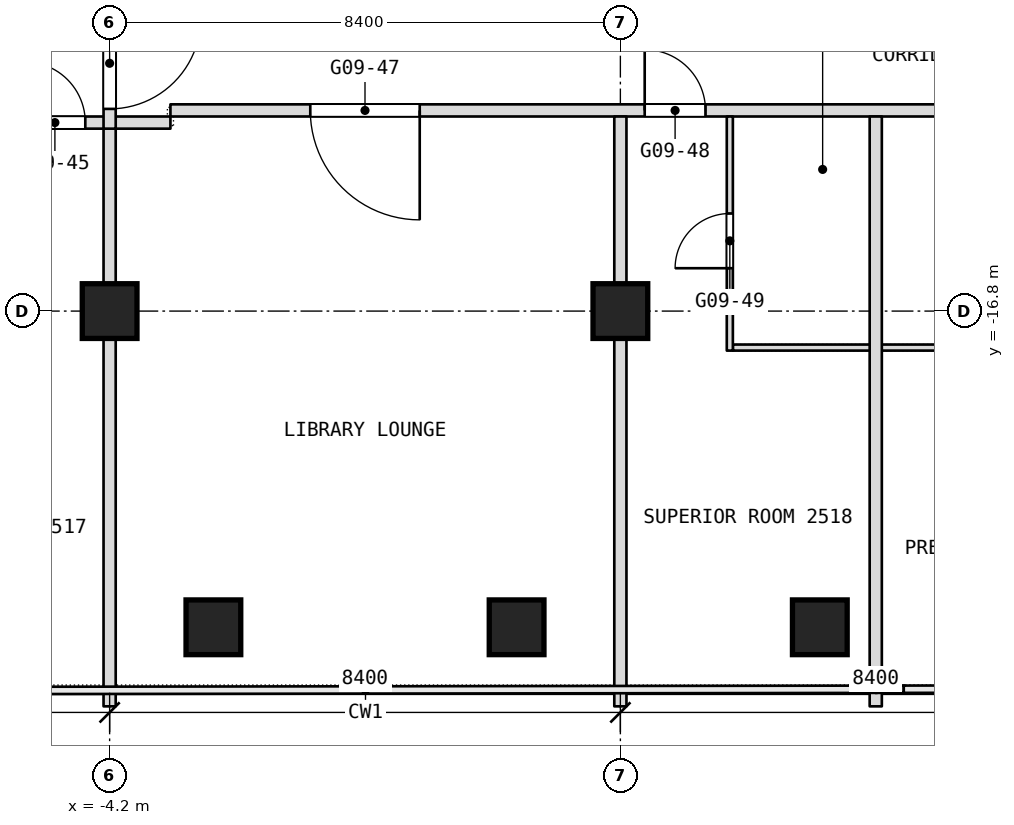
"""IFC4 building model, lengths in metres.
Left out: names, types, materials, properties, quantities, classifications, styles, units other than length and angle.
Written with IfcOpenShell. Run it as: python <this file> out.ifc"""

import sys

from ifc_helpers import new_model, si_unit, direction, frame, frame_2d, origin, origin_2d, place, context, subcontext, project, spatial, rectangle, extrude, element, fill, save


model = new_model("IFC4")
c1 = context("Model", 3, precision=1e-05, world=origin(), true_north=direction((0.0, 1.0)))
c2 = subcontext(c1, "Body", "Model", "MODEL_VIEW")
j1 = project(units=[si_unit("LENGTHUNIT", "METRE"), si_unit("PLANEANGLEUNIT", "RADIAN")], contexts=[c1])
p1 = place(None, origin())
s1 = spatial("IfcSite", under=j1, at=p1, CompositionType="ELEMENT")
p2 = place(p1, origin())
s2 = spatial("IfcBuilding", under=s1, at=p2, CompositionType="ELEMENT")
p3 = place(p2, frame((0.0, 0.0, 115.7)))
s3 = spatial("IfcBuildingStorey", under=s2, at=p3, CompositionType="ELEMENT", Elevation=115.7)
for number, where, z_axis, x_axis in (
    (1, (-4.2, -16.8, 0.0), (0.0, 0.0, 1.0), (1.0, 0.0, 0.0)),
    (2, (4.2, -16.8, 0.0), (0.0, 0.0, 1.0), (1.0, 0.0, 0.0)),
    (3, (7.48, -22.0, 0.0), (0.0, 0.0, 1.0), (1.0, 0.0, 0.0)),
    (4, (2.493, -22.0, 0.0), (0.0, 0.0, 1.0), (1.0, 0.0, 0.0)),
    (5, (-2.493, -22.0, 0.0), (0.0, 0.0, 1.0), (1.0, 0.0, 0.0)),
):
    element("IfcColumn", number, at=place(p3, frame(where, z_axis=z_axis, x_axis=x_axis)), inside=s3, PredefinedType="COLUMN", context=c2, shape_type="SweptSolid", body=[
        extrude(rectangle(XDim=0.9, YDim=0.9, at=origin_2d()), origin(), (0.0, 0.0, 1.0), 3.6),
    ])
p4 = place(p3, frame((6.05, -17.4, 0.0), z_axis=(0.0, 0.0, 1.0), x_axis=(1.0, 0.0, 0.0)))
e6 = element("IfcWall", 6, at=p4, inside=s3, PredefinedType="PARTITIONING", context=c2, shape_type="SweptSolid", body=[
    extrude(rectangle(XDim=4.8, YDim=0.1, at=frame_2d((2.4, 0.0))), origin(), (0.0, 0.0, 1.0), 3.34),
])
p5 = place(p4, frame((3.75, 0.0, 0.0)))
e7 = element("IfcOpeningElement", 7, at=p5, cuts=e6, PredefinedType="OPENING", context=c2, shape_type="SweptSolid", body=[
    extrude(rectangle(XDim=0.9, YDim=2.1, at=frame_2d((0.45, 1.05))), frame((0.0, 0.05, 0.0), z_axis=(0.0, -1.0, 0.0), x_axis=(1.0, 0.0, 0.0)), (0.0, 0.0, 1.0), 0.1),
])
p6 = place(p3, frame((-12.4, -13.7, 0.0), z_axis=(0.0, 0.0, 1.0), x_axis=(1.0, 0.0, 0.0)))
e8 = element("IfcWall", 8, at=p6, inside=s3, PredefinedType="PARTITIONING", context=c2, shape_type="SweptSolid", body=[
    extrude(rectangle(XDim=9.2, YDim=0.2, at=frame_2d((4.6, 0.0))), origin(), (0.0, 0.0, 1.0), 3.34),
])
p7 = place(p6, frame((0.2, 0.0, 0.0)))
e9 = element("IfcOpeningElement", 9, at=p7, cuts=e8, PredefinedType="OPENING", context=c2, shape_type="SweptSolid", body=[
    extrude(rectangle(XDim=1.0, YDim=2.1, at=frame_2d((0.5, 1.05))), frame((0.0, 0.1, 0.0), z_axis=(0.0, -1.0, 0.0), x_axis=(1.0, 0.0, 0.0)), (0.0, 0.0, 1.0), 0.2),
])
p8 = place(p6, frame((6.8, 0.0, 0.0)))
e10 = element("IfcOpeningElement", 10, at=p8, cuts=e8, PredefinedType="OPENING", context=c2, shape_type="SweptSolid", body=[
    extrude(rectangle(XDim=1.0, YDim=2.1, at=frame_2d((0.5, 1.05))), frame((0.0, 0.1, 0.0), z_axis=(0.0, -1.0, 0.0), x_axis=(1.0, 0.0, 0.0)), (0.0, 0.0, 1.0), 0.2),
])
p9 = place(p3, frame((-3.2, -13.5, 0.0), z_axis=(0.0, 0.0, 1.0), x_axis=(1.0, 0.0, 0.0)))
e11 = element("IfcWall", 11, at=p9, inside=s3, PredefinedType="PARTITIONING", context=c2, shape_type="SweptSolid", body=[
    extrude(rectangle(XDim=19.9, YDim=0.2, at=frame_2d((9.95, 0.0))), origin(), (0.0, 0.0, 1.0), 3.34),
])
p10 = place(p9, frame((2.3, 0.0, 0.0)))
e12 = element("IfcOpeningElement", 12, at=p10, cuts=e11, PredefinedType="OPENING", context=c2, shape_type="SweptSolid", body=[
    extrude(rectangle(XDim=1.8, YDim=2.1, at=frame_2d((0.9, 1.05))), frame((0.0, 0.1, 0.0), z_axis=(0.0, -1.0, 0.0), x_axis=(1.0, 0.0, 0.0)), (0.0, 0.0, 1.0), 0.2),
])
p11 = place(p9, frame((7.8, 0.0, 0.0)))
e13 = element("IfcOpeningElement", 13, at=p11, cuts=e11, PredefinedType="OPENING", context=c2, shape_type="SweptSolid", body=[
    extrude(rectangle(XDim=1.0, YDim=2.1, at=frame_2d((0.5, 1.05))), frame((0.0, 0.1, 0.0), z_axis=(0.0, -1.0, 0.0), x_axis=(1.0, 0.0, 0.0)), (0.0, 0.0, 1.0), 0.2),
])
p12 = place(p9, frame((14.4, 0.0, 0.0)))
e14 = element("IfcOpeningElement", 14, at=p12, cuts=e11, PredefinedType="OPENING", context=c2, shape_type="SweptSolid", body=[
    extrude(rectangle(XDim=1.0, YDim=2.1, at=frame_2d((0.5, 1.05))), frame((0.0, 0.1, 0.0), z_axis=(0.0, -1.0, 0.0), x_axis=(1.0, 0.0, 0.0)), (0.0, 0.0, 1.0), 0.2),
])
p13 = place(p9, frame((18.6, 0.0, 0.0)))
e15 = element("IfcOpeningElement", 15, at=p13, cuts=e11, PredefinedType="OPENING", context=c2, shape_type="SweptSolid", body=[
    extrude(rectangle(XDim=1.0, YDim=2.1, at=frame_2d((0.5, 1.05))), frame((0.0, 0.1, 0.0), z_axis=(0.0, -1.0, 0.0), x_axis=(1.0, 0.0, 0.0)), (0.0, 0.0, 1.0), 0.2),
])
p14 = place(p3, frame((8.4, -23.3, 0.0), z_axis=(0.0, 0.0, 1.0), x_axis=(0.0, 1.0, 0.0)))
e16 = element("IfcWall", 16, at=p14, inside=s3, PredefinedType="PARTITIONING", context=c2, shape_type="SweptSolid", body=[
    extrude(rectangle(XDim=9.7, YDim=0.2, at=frame_2d((4.85, 0.0))), origin(), (0.0, 0.0, 1.0), 3.34),
])
p15 = place(p3, frame((6.0, -17.45, 0.0), z_axis=(0.0, 0.0, 1.0), x_axis=(0.0, 1.0, 0.0)))
e17 = element("IfcWall", 17, at=p15, inside=s3, PredefinedType="PARTITIONING", context=c2, shape_type="SweptSolid", body=[
    extrude(rectangle(XDim=3.85, YDim=0.1, at=frame_2d((1.925, 0.0))), origin(), (0.0, 0.0, 1.0), 3.34),
])
p16 = place(p15, frame((1.355, 0.0, 0.0)))
e18 = element("IfcOpeningElement", 18, at=p16, cuts=e17, PredefinedType="OPENING", context=c2, shape_type="SweptSolid", body=[
    extrude(rectangle(XDim=0.9, YDim=2.1, at=frame_2d((0.45, 1.05))), frame((0.0, 0.05, 0.0), z_axis=(0.0, -1.0, 0.0), x_axis=(1.0, 0.0, 0.0)), (0.0, 0.0, 1.0), 0.1),
])
p17 = place(p3, frame((4.2, -23.3, 0.0), z_axis=(0.0, 0.0, 1.0), x_axis=(0.0, 1.0, 0.0)))
e19 = element("IfcWall", 19, at=p17, inside=s3, PredefinedType="PARTITIONING", context=c2, shape_type="SweptSolid", body=[
    extrude(rectangle(XDim=9.7, YDim=0.2, at=frame_2d((4.85, 0.0))), origin(), (0.0, 0.0, 1.0), 3.34),
])
p18 = place(p3, frame((-4.2, -23.3, 0.0), z_axis=(0.0, 0.0, 1.0), x_axis=(0.0, 1.0, 0.0)))
e20 = element("IfcWall", 20, at=p18, inside=s3, PredefinedType="PARTITIONING", context=c2, shape_type="SweptSolid", body=[
    extrude(rectangle(XDim=9.5, YDim=0.2, at=frame_2d((4.75, 0.0))), origin(), (0.0, 0.0, 1.0), 3.34),
])
p19 = place(p3, frame((-4.2, -13.8, 0.0), z_axis=(0.0, 0.0, 1.0), x_axis=(0.0, 1.0, 0.0)))
e21 = element("IfcWall", 21, at=p19, inside=s3, PredefinedType="PARTITIONING", context=c2, shape_type="SweptSolid", body=[
    extrude(rectangle(XDim=13.8, YDim=0.2, at=frame_2d((6.9, 0.0))), origin(), (0.0, 0.0, 1.0), 3.34),
])
p20 = place(p19, frame((12.15, 0.0, 0.0)))
e22 = element("IfcOpeningElement", 22, at=p20, cuts=e21, PredefinedType="OPENING", context=c2, shape_type="SweptSolid", body=[
    extrude(rectangle(XDim=1.5, YDim=2.1, at=frame_2d((0.75, 1.05))), frame((0.0, 0.1, 0.0), z_axis=(0.0, -1.0, 0.0), x_axis=(1.0, 0.0, 0.0)), (0.0, 0.0, 1.0), 0.2),
])
p21 = place(p19, frame((0.325, 0.0, 0.0)))
e23 = element("IfcOpeningElement", 23, at=p21, cuts=e21, PredefinedType="OPENING", context=c2, shape_type="SweptSolid", body=[
    extrude(rectangle(XDim=1.5, YDim=2.1, at=frame_2d((0.75, 1.05))), frame((0.0, 0.1, 0.0), z_axis=(0.0, -1.0, 0.0), x_axis=(1.0, 0.0, 0.0)), (0.0, 0.0, 1.0), 0.2),
])
p22 = place(p8, origin())
e24 = element("IfcDoor", 24, at=p22, inside=s3, OperationType="SINGLE_SWING_LEFT", PredefinedType="DOOR", context=c2, shape_type="SweptSolid", body=[
    extrude(rectangle(XDim=1.0, YDim=2.1, at=frame_2d((0.5, 1.05))), frame((0.0, 0.025, 0.0), z_axis=(0.0, -1.0, 0.0), x_axis=(1.0, 0.0, 0.0)), (0.0, 0.0, 1.0), 0.05),
])
fill(e10, e24)
p23 = place(p10, origin())
e25 = element("IfcDoor", 25, at=p23, inside=s3, OperationType="DOUBLE_DOOR_SINGLE_SWING", PredefinedType="DOOR", context=c2, shape_type="SweptSolid", body=[
    extrude(rectangle(XDim=1.8, YDim=2.1, at=frame_2d((0.9, 1.05))), frame((0.0, 0.025, 0.0), z_axis=(0.0, -1.0, 0.0), x_axis=(1.0, 0.0, 0.0)), (0.0, 0.0, 1.0), 0.05),
])
fill(e12, e25)
p24 = place(p11, origin())
e26 = element("IfcDoor", 26, at=p24, inside=s3, OperationType="SINGLE_SWING_RIGHT", PredefinedType="DOOR", context=c2, shape_type="SweptSolid", body=[
    extrude(rectangle(XDim=1.0, YDim=2.1, at=frame_2d((0.5, 1.05))), frame((0.0, 0.025, 0.0), z_axis=(0.0, -1.0, 0.0), x_axis=(1.0, 0.0, 0.0)), (0.0, 0.0, 1.0), 0.05),
])
fill(e13, e26)
p25 = place(p16, origin())
e27 = element("IfcDoor", 27, at=p25, inside=s3, OperationType="SINGLE_SWING_RIGHT", PredefinedType="DOOR", context=c2, shape_type="SweptSolid", body=[
    extrude(rectangle(XDim=0.9, YDim=2.1, at=frame_2d((0.45, 1.05))), frame((0.0, 0.025, 0.0), z_axis=(0.0, -1.0, 0.0), x_axis=(1.0, 0.0, 0.0)), (0.0, 0.0, 1.0), 0.05),
])
fill(e18, e27)
p26 = place(p21, origin())
e28 = element("IfcDoor", 28, at=p26, inside=s3, OperationType="DOUBLE_DOOR_DOUBLE_SWING", PredefinedType="DOOR", context=c2, shape_type="SweptSolid", body=[
    extrude(rectangle(XDim=1.5, YDim=2.1, at=frame_2d((0.75, 1.05))), frame((0.0, 0.025, 0.0), z_axis=(0.0, -1.0, 0.0), x_axis=(1.0, 0.0, 0.0)), (0.0, 0.0, 1.0), 0.05),
])
fill(e23, e28)
save(model, sys.argv[1])
